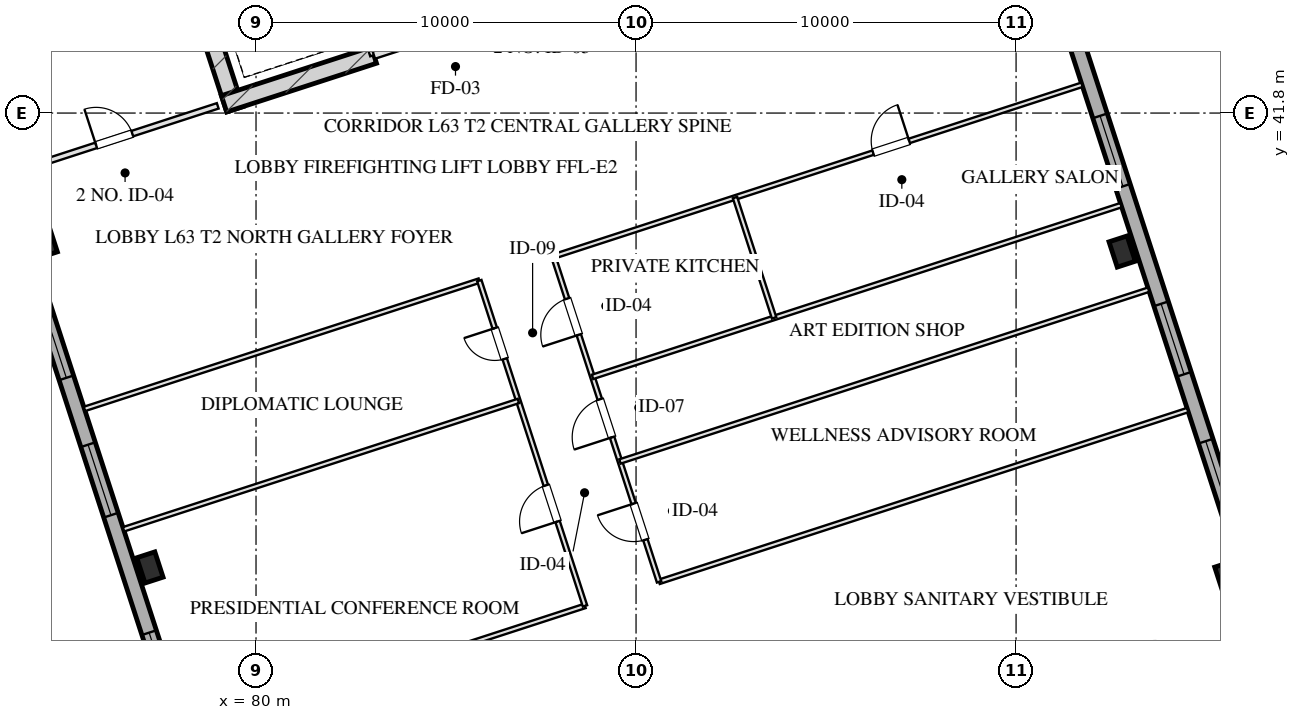
"""IFC4 building model, lengths in metres.
Left out: names, types, materials, properties, quantities, classifications, styles, units other than length and angle.
Written with IfcOpenShell. Run it as: python <this file> out.ifc"""

import sys

from ifc_helpers import new_model, si_unit, direction, frame, frame_2d, origin, origin_2d, place, context, subcontext, project, spatial, rectangle, hollow_rectangle, extrude, element, fill, save


model = new_model("IFC4")
c1 = context("Model", 3, precision=1e-05, world=origin(), true_north=direction((0.0, 1.0)))
c2 = subcontext(c1, "Body", "Model", "MODEL_VIEW")
j1 = project(units=[si_unit("LENGTHUNIT", "METRE"), si_unit("PLANEANGLEUNIT", "RADIAN")], contexts=[c1])
p1 = place(None, origin())
s1 = spatial("IfcSite", under=j1, at=p1, CompositionType="ELEMENT")
p2 = place(p1, origin())
s2 = spatial("IfcBuilding", under=s1, at=p2, CompositionType="ELEMENT")
p3 = place(p2, frame((0.0, 0.0, 234.4)))
s3 = spatial("IfcBuildingStorey", under=s2, at=p3, CompositionType="ELEMENT", Elevation=234.4)
p4 = place(p3, frame((79.442, 41.899, 0.0), z_axis=(0.0, 0.0, 1.0), x_axis=(-0.309035778627, 0.951050412717, 0.0)))
e1 = element("IfcWall", 1, at=p4, inside=s3, PredefinedType="SHEAR", context=c2, shape_type="SweptSolid", body=[
    extrude(rectangle(XDim=9.33, YDim=0.45, at=frame_2d((4.665, 0.0))), origin(), (0.0, 0.0, 1.0), 3.2),
])
p5 = place(p3, frame((79.159, 42.043, 0.0), z_axis=(0.0, 0.0, 1.0), x_axis=(0.951047485828, 0.309044785913, 0.0)))
e2 = element("IfcWall", 2, at=p5, inside=s3, PredefinedType="SHEAR", context=c2, shape_type="SweptSolid", body=[
    extrude(rectangle(XDim=4.145, YDim=0.45, at=frame_2d((2.073, 0.0))), origin(), (0.0, 0.0, 1.0), 3.2),
])
for number, where, z_axis, x_axis in (
    (3, (77.208, 29.844, 0.0), (0.0, 0.0, 1.0), (0.951, 0.309, 0.0)),
    (4, (74.427, 38.403, 0.0), (0.0, 0.0, 1.0), (0.951, 0.309, 0.0)),
    (5, (105.573, 29.597, 0.0), (0.0, 0.0, 1.0), (0.951, 0.309, 0.0)),
    (6, (102.792, 38.156, 0.0), (0.0, 0.0, 1.0), (0.951, 0.309, 0.0)),
):
    element("IfcColumn", number, at=place(p3, frame(where, z_axis=z_axis, x_axis=x_axis)), inside=s3, PredefinedType="COLUMN", context=c2, shape_type="SweptSolid", body=[
        extrude(hollow_rectangle(XDim=0.5, YDim=0.7, WallThickness=0.025, at=origin_2d()), origin(), (0.0, 0.0, 1.0), 3.201),
    ])
p6 = place(p3, frame((82.618, 11.414, 0.0), z_axis=(0.0, 0.0, 1.0), x_axis=(-0.309016491071, 0.951056679828, 0.0)))
e7 = element("IfcWall", 7, at=p6, inside=s3, PredefinedType="SOLIDWALL", context=c2, shape_type="SweptSolid", body=[
    extrude(rectangle(XDim=38.4, YDim=0.4, at=frame_2d((19.2, 0.0))), origin(), (0.0, 0.0, 1.0), 2.36),
])
p7 = place(p6, frame((11.825, 0.0, 0.75)))
e8 = element("IfcOpeningElement", 8, at=p7, cuts=e7, PredefinedType="OPENING", context=c2, shape_type="SweptSolid", body=[
    extrude(rectangle(XDim=1.95, YDim=1.21, at=frame_2d((0.975, 0.605))), frame((0.0, 0.21, 0.0), z_axis=(0.0, -1.0, 0.0), x_axis=(1.0, 0.0, 0.0)), (0.0, 0.0, 1.0), 0.42),
])
p8 = place(p6, frame((15.625, 0.0, 0.75)))
e9 = element("IfcOpeningElement", 9, at=p8, cuts=e7, PredefinedType="OPENING", context=c2, shape_type="SweptSolid", body=[
    extrude(rectangle(XDim=1.95, YDim=1.21, at=frame_2d((0.975, 0.605))), frame((0.0, 0.21, 0.0), z_axis=(0.0, -1.0, 0.0), x_axis=(1.0, 0.0, 0.0)), (0.0, 0.0, 1.0), 0.42),
])
p9 = place(p6, frame((20.825, 0.0, 0.75)))
e10 = element("IfcOpeningElement", 10, at=p9, cuts=e7, PredefinedType="OPENING", context=c2, shape_type="SweptSolid", body=[
    extrude(rectangle(XDim=1.95, YDim=1.21, at=frame_2d((0.975, 0.605))), frame((0.0, 0.21, 0.0), z_axis=(0.0, -1.0, 0.0), x_axis=(1.0, 0.0, 0.0)), (0.0, 0.0, 1.0), 0.42),
])
p10 = place(p6, frame((24.625, 0.0, 0.75)))
e11 = element("IfcOpeningElement", 11, at=p10, cuts=e7, PredefinedType="OPENING", context=c2, shape_type="SweptSolid", body=[
    extrude(rectangle(XDim=1.95, YDim=1.21, at=frame_2d((0.975, 0.605))), frame((0.0, 0.21, 0.0), z_axis=(0.0, -1.0, 0.0), x_axis=(1.0, 0.0, 0.0)), (0.0, 0.0, 1.0), 0.42),
])
p11 = place(p3, frame((97.382, 56.586, 0.0), z_axis=(0.0, 0.0, 1.0), x_axis=(0.309016491071, -0.951056679828, 0.0)))
e12 = element("IfcWall", 12, at=p11, inside=s3, PredefinedType="SOLIDWALL", context=c2, shape_type="SweptSolid", body=[
    extrude(rectangle(XDim=38.4, YDim=0.4, at=frame_2d((19.2, 0.0))), origin(), (0.0, 0.0, 1.0), 2.36),
])
p12 = place(p11, frame((24.625, 0.0, 0.75)))
e13 = element("IfcOpeningElement", 13, at=p12, cuts=e12, PredefinedType="OPENING", context=c2, shape_type="SweptSolid", body=[
    extrude(rectangle(XDim=1.95, YDim=1.21, at=frame_2d((0.975, 0.605))), frame((0.0, 0.21, 0.0), z_axis=(0.0, -1.0, 0.0), x_axis=(1.0, 0.0, 0.0)), (0.0, 0.0, 1.0), 0.42),
])
p13 = place(p11, frame((20.825, 0.0, 0.75)))
e14 = element("IfcOpeningElement", 14, at=p13, cuts=e12, PredefinedType="OPENING", context=c2, shape_type="SweptSolid", body=[
    extrude(rectangle(XDim=1.95, YDim=1.21, at=frame_2d((0.975, 0.605))), frame((0.0, 0.21, 0.0), z_axis=(0.0, -1.0, 0.0), x_axis=(1.0, 0.0, 0.0)), (0.0, 0.0, 1.0), 0.42),
])
p14 = place(p11, frame((15.625, 0.0, 0.75)))
e15 = element("IfcOpeningElement", 15, at=p14, cuts=e12, PredefinedType="OPENING", context=c2, shape_type="SweptSolid", body=[
    extrude(rectangle(XDim=1.95, YDim=1.21, at=frame_2d((0.975, 0.605))), frame((0.0, 0.21, 0.0), z_axis=(0.0, -1.0, 0.0), x_axis=(1.0, 0.0, 0.0)), (0.0, 0.0, 1.0), 0.42),
])
p15 = place(p11, frame((11.825, 0.0, 0.75)))
e16 = element("IfcOpeningElement", 16, at=p15, cuts=e12, PredefinedType="OPENING", context=c2, shape_type="SweptSolid", body=[
    extrude(rectangle(XDim=1.95, YDim=1.21, at=frame_2d((0.975, 0.605))), frame((0.0, 0.21, 0.0), z_axis=(0.0, -1.0, 0.0), x_axis=(1.0, 0.0, 0.0)), (0.0, 0.0, 1.0), 0.42),
])
p16 = place(p3, frame((83.101, 43.324, 0.0), z_axis=(0.0, 0.0, 1.0), x_axis=(-0.309048298632, 0.951046344356, 0.0)))
e17 = element("IfcWall", 17, at=p16, inside=s3, PredefinedType="PARTITIONING", context=c2, shape_type="SweptSolid", body=[
    extrude(rectangle(XDim=1.9, YDim=0.2, at=frame_2d((0.95, 0.0))), origin(), (0.0, 0.0, 1.0), 2.925),
])
p17 = place(p16, frame((0.52, 0.0, 0.0)))
e18 = element("IfcOpeningElement", 18, at=p17, cuts=e17, PredefinedType="OPENING", context=c2, shape_type="SweptSolid", body=[
    extrude(rectangle(XDim=1.1, YDim=2.05, at=frame_2d((0.55, 1.025))), frame((0.0, 0.11, 0.0), z_axis=(0.0, -1.0, 0.0), x_axis=(1.0, 0.0, 0.0)), (0.0, 0.0, 1.0), 0.22),
])
p18 = place(p3, frame((83.101, 43.324, 0.0), z_axis=(0.0, 0.0, 1.0), x_axis=(0.951052804469, 0.309028417967, 0.0)))
e19 = element("IfcWall", 19, at=p18, inside=s3, PredefinedType="PARTITIONING", context=c2, shape_type="SweptSolid", body=[
    extrude(rectangle(XDim=3.83, YDim=0.2, at=frame_2d((1.915, 0.0))), origin(), (0.0, 0.0, 1.0), 2.925),
])
p19 = place(p18, frame((1.35, 0.0, 0.0)))
e20 = element("IfcOpeningElement", 20, at=p19, cuts=e19, PredefinedType="OPENING", context=c2, shape_type="SweptSolid", body=[
    extrude(rectangle(XDim=1.2, YDim=2.05, at=frame_2d((0.6, 1.025))), frame((0.0, 0.11, 0.0), z_axis=(0.0, -1.0, 0.0), x_axis=(1.0, 0.0, 0.0)), (0.0, 0.0, 1.0), 0.22),
])
p20 = place(p3, frame((73.476, 40.197, 0.0), z_axis=(0.0, 0.0, 1.0), x_axis=(0.951059431056, 0.309008023519, 0.0)))
e21 = element("IfcWall", 21, at=p20, inside=s3, PredefinedType="PARTITIONING", context=c2, shape_type="SweptSolid", body=[
    extrude(rectangle(XDim=5.8, YDim=0.15, at=frame_2d((2.9, 0.0))), origin(), (0.0, 0.0, 1.0), 2.925),
])
p21 = place(p20, frame((2.436, 0.0, 0.0)))
e22 = element("IfcOpeningElement", 22, at=p21, cuts=e21, PredefinedType="OPENING", context=c2, shape_type="SweptSolid", body=[
    extrude(rectangle(XDim=1.0, YDim=2.05, at=frame_2d((0.5, 1.025))), frame((0.0, 0.085, 0.0), z_axis=(0.0, -1.0, 0.0), x_axis=(1.0, 0.0, 0.0)), (0.0, 0.0, 1.0), 0.17),
])
p22 = place(p3, frame((78.266, 25.456, 0.0), z_axis=(0.0, 0.0, 1.0), x_axis=(0.951056072529, 0.309018360142, 0.0)))
e23 = element("IfcWall", 23, at=p22, inside=s3, PredefinedType="PARTITIONING", context=c2, shape_type="SweptSolid", body=[
    extrude(rectangle(XDim=10.925, YDim=0.12, at=frame_2d((5.462, 0.0))), origin(), (0.0, 0.0, 1.0), 2.925),
])
p23 = place(p3, frame((90.606, 29.465, 0.0), z_axis=(0.0, 0.0, 1.0), x_axis=(0.951058110432, 0.309012088082, 0.0)))
e24 = element("IfcWall", 24, at=p23, inside=s3, PredefinedType="PARTITIONING", context=c2, shape_type="SweptSolid", body=[
    extrude(rectangle(XDim=14.625, YDim=0.12, at=frame_2d((7.312, 0.0))), origin(), (0.0, 0.0, 1.0), 2.925),
])
p24 = place(p3, frame((75.485, 34.015, 0.0), z_axis=(0.0, 0.0, 1.0), x_axis=(0.951058206457, 0.309011792544, 0.0)))
e25 = element("IfcWall", 25, at=p24, inside=s3, PredefinedType="PARTITIONING", context=c2, shape_type="SweptSolid", body=[
    extrude(rectangle(XDim=10.925, YDim=0.12, at=frame_2d((5.462, 0.0))), origin(), (0.0, 0.0, 1.0), 2.925),
])
p25 = place(p3, frame((87.825, 38.025, 0.0), z_axis=(0.0, 0.0, 1.0), x_axis=(0.951058110432, 0.309012088082, 0.0)))
e26 = element("IfcWall", 26, at=p25, inside=s3, PredefinedType="PARTITIONING", context=c2, shape_type="SweptSolid", body=[
    extrude(rectangle(XDim=14.625, YDim=0.12, at=frame_2d((7.312, 0.0))), origin(), (0.0, 0.0, 1.0), 2.925),
])
p26 = place(p25, frame((8.845, 0.0, 0.0)))
e27 = element("IfcOpeningElement", 27, at=p26, cuts=e26, PredefinedType="OPENING", context=c2, shape_type="SweptSolid", body=[
    extrude(rectangle(XDim=1.0, YDim=2.05, at=frame_2d((0.5, 1.025))), frame((0.0, 0.07, 0.0), z_axis=(0.0, -1.0, 0.0), x_axis=(1.0, 0.0, 0.0)), (0.0, 0.0, 1.0), 0.14),
])
p27 = place(p3, frame((88.656, 28.832, 0.0), z_axis=(0.0, 0.0, 1.0), x_axis=(-0.309000197986, 0.951061973609, 0.0)))
e28 = element("IfcWall", 28, at=p27, inside=s3, PredefinedType="PARTITIONING", context=c2, shape_type="SweptSolid", body=[
    extrude(rectangle(XDim=9.0, YDim=0.12, at=frame_2d((4.5, 0.0))), origin(), (0.0, 0.0, 1.0), 2.925),
])
p28 = place(p27, frame((2.335, 0.0, 0.0)))
e29 = element("IfcOpeningElement", 29, at=p28, cuts=e28, PredefinedType="OPENING", context=c2, shape_type="SweptSolid", body=[
    extrude(rectangle(XDim=1.0, YDim=2.05, at=frame_2d((0.5, 1.025))), frame((0.0, 0.07, 0.0), z_axis=(0.0, -1.0, 0.0), x_axis=(1.0, 0.0, 0.0)), (0.0, 0.0, 1.0), 0.14),
])
p29 = place(p27, frame((6.835, 0.0, 0.0)))
e30 = element("IfcOpeningElement", 30, at=p29, cuts=e28, PredefinedType="OPENING", context=c2, shape_type="SweptSolid", body=[
    extrude(rectangle(XDim=0.85, YDim=2.05, at=frame_2d((0.425, 1.025))), frame((0.0, 0.07, 0.0), z_axis=(0.0, -1.0, 0.0), x_axis=(1.0, 0.0, 0.0)), (0.0, 0.0, 1.0), 0.14),
])
p30 = place(p3, frame((90.606, 29.465, 0.0), z_axis=(0.0, 0.0, 1.0), x_axis=(-0.309024734286, 0.951054001411, 0.0)))
e31 = element("IfcWall", 31, at=p30, inside=s3, PredefinedType="PARTITIONING", context=c2, shape_type="SweptSolid", body=[
    extrude(rectangle(XDim=9.0, YDim=0.12, at=frame_2d((4.5, 0.0))), origin(), (0.0, 0.0, 1.0), 2.925),
])
p31 = place(p30, frame((1.165, 0.0, 0.0)))
e32 = element("IfcOpeningElement", 32, at=p31, cuts=e31, PredefinedType="OPENING", context=c2, shape_type="SweptSolid", body=[
    extrude(rectangle(XDim=1.0, YDim=2.05, at=frame_2d((0.5, 1.025))), frame((0.0, 0.07, 0.0), z_axis=(0.0, -1.0, 0.0), x_axis=(1.0, 0.0, 0.0)), (0.0, 0.0, 1.0), 0.14),
])
p32 = place(p30, frame((4.0, 0.0, 0.0)))
e33 = element("IfcOpeningElement", 33, at=p32, cuts=e31, PredefinedType="OPENING", context=c2, shape_type="SweptSolid", body=[
    extrude(rectangle(XDim=1.05, YDim=2.05, at=frame_2d((0.525, 1.025))), frame((0.0, 0.07, 0.0), z_axis=(0.0, -1.0, 0.0), x_axis=(1.0, 0.0, 0.0)), (0.0, 0.0, 1.0), 0.14),
])
p33 = place(p30, frame((6.835, 0.0, 0.0)))
e34 = element("IfcOpeningElement", 34, at=p33, cuts=e31, PredefinedType="OPENING", context=c2, shape_type="SweptSolid", body=[
    extrude(rectangle(XDim=1.0, YDim=2.05, at=frame_2d((0.5, 1.025))), frame((0.0, 0.07, 0.0), z_axis=(0.0, -1.0, 0.0), x_axis=(1.0, 0.0, 0.0)), (0.0, 0.0, 1.0), 0.14),
])
p34 = place(p3, frame((76.514, 30.848, 0.0), z_axis=(0.0, 0.0, 1.0), x_axis=(0.951056072529, 0.309018360142, 0.0)))
e35 = element("IfcWall", 35, at=p34, inside=s3, PredefinedType="PARTITIONING", context=c2, shape_type="SweptSolid", body=[
    extrude(rectangle(XDim=10.925, YDim=0.12, at=frame_2d((5.462, 0.0))), origin(), (0.0, 0.0, 1.0), 2.925),
])
for number, where, z_axis, x_axis in (
    (36, (89.577, 32.632, 0.0), (0.0, 0.0, 1.0), (0.951, 0.309, 0.0)),
    (37, (88.854, 34.858, 0.0), (0.0, 0.0, 1.0), (0.951, 0.309, 0.0)),
):
    element("IfcWall", number, at=place(p3, frame(where, z_axis=z_axis, x_axis=x_axis)), inside=s3, PredefinedType="PARTITIONING", context=c2, shape_type="SweptSolid", body=[
        extrude(rectangle(XDim=14.625, YDim=0.12, at=frame_2d((7.312, 0.0))), origin(), (0.0, 0.0, 1.0), 2.925),
    ])
p35 = place(p3, frame((93.633, 36.411, 0.0), z_axis=(0.0, 0.0, 1.0), x_axis=(-0.309026391202, 0.95105346303, 0.0)))
e38 = element("IfcWall", 38, at=p35, inside=s3, PredefinedType="PARTITIONING", context=c2, shape_type="SweptSolid", body=[
    extrude(rectangle(XDim=3.33, YDim=0.12, at=frame_2d((1.665, 0.0))), origin(), (0.0, 0.0, 1.0), 2.925),
])
p36 = place(p8, origin())
e39 = element("IfcWindow", 39, at=p36, inside=s3, PartitioningType="TRIPLE_PANEL_VERTICAL", PredefinedType="WINDOW", context=c2, shape_type="SweptSolid", body=[
    extrude(rectangle(XDim=1.95, YDim=1.21, at=frame_2d((0.975, 0.605))), frame((0.0, 0.03, 0.0), z_axis=(0.0, -1.0, 0.0), x_axis=(1.0, 0.0, 0.0)), (0.0, 0.0, 1.0), 0.06),
])
fill(e9, e39)
p37 = place(p9, origin())
e40 = element("IfcWindow", 40, at=p37, inside=s3, PartitioningType="TRIPLE_PANEL_VERTICAL", PredefinedType="WINDOW", context=c2, shape_type="SweptSolid", body=[
    extrude(rectangle(XDim=1.95, YDim=1.21, at=frame_2d((0.975, 0.605))), frame((0.0, 0.03, 0.0), z_axis=(0.0, -1.0, 0.0), x_axis=(1.0, 0.0, 0.0)), (0.0, 0.0, 1.0), 0.06),
])
fill(e10, e40)
p38 = place(p10, origin())
e41 = element("IfcWindow", 41, at=p38, inside=s3, PartitioningType="TRIPLE_PANEL_VERTICAL", PredefinedType="WINDOW", context=c2, shape_type="SweptSolid", body=[
    extrude(rectangle(XDim=1.95, YDim=1.21, at=frame_2d((0.975, 0.605))), frame((0.0, 0.03, 0.0), z_axis=(0.0, -1.0, 0.0), x_axis=(1.0, 0.0, 0.0)), (0.0, 0.0, 1.0), 0.06),
])
fill(e11, e41)
p39 = place(p12, origin())
e42 = element("IfcWindow", 42, at=p39, inside=s3, PartitioningType="TRIPLE_PANEL_VERTICAL", PredefinedType="WINDOW", context=c2, shape_type="SweptSolid", body=[
    extrude(rectangle(XDim=1.95, YDim=1.21, at=frame_2d((0.975, 0.605))), frame((0.0, 0.03, 0.0), z_axis=(0.0, -1.0, 0.0), x_axis=(1.0, 0.0, 0.0)), (0.0, 0.0, 1.0), 0.06),
])
fill(e13, e42)
p40 = place(p13, origin())
e43 = element("IfcWindow", 43, at=p40, inside=s3, PartitioningType="TRIPLE_PANEL_VERTICAL", PredefinedType="WINDOW", context=c2, shape_type="SweptSolid", body=[
    extrude(rectangle(XDim=1.95, YDim=1.21, at=frame_2d((0.975, 0.605))), frame((0.0, 0.03, 0.0), z_axis=(0.0, -1.0, 0.0), x_axis=(1.0, 0.0, 0.0)), (0.0, 0.0, 1.0), 0.06),
])
fill(e14, e43)
p41 = place(p14, origin())
e44 = element("IfcWindow", 44, at=p41, inside=s3, PartitioningType="TRIPLE_PANEL_VERTICAL", PredefinedType="WINDOW", context=c2, shape_type="SweptSolid", body=[
    extrude(rectangle(XDim=1.95, YDim=1.21, at=frame_2d((0.975, 0.605))), frame((0.0, 0.03, 0.0), z_axis=(0.0, -1.0, 0.0), x_axis=(1.0, 0.0, 0.0)), (0.0, 0.0, 1.0), 0.06),
])
fill(e15, e44)
p42 = place(p21, origin())
e45 = element("IfcDoor", 45, at=p42, inside=s3, OperationType="SINGLE_SWING_LEFT", PredefinedType="DOOR", context=c2, shape_type="SweptSolid", body=[
    extrude(rectangle(XDim=1.0, YDim=2.05, at=frame_2d((0.5, 1.025))), frame((0.0, 0.025, 0.0), z_axis=(0.0, -1.0, 0.0), x_axis=(1.0, 0.0, 0.0)), (0.0, 0.0, 1.0), 0.05),
])
fill(e22, e45)
p43 = place(p26, origin())
e46 = element("IfcDoor", 46, at=p43, inside=s3, OperationType="SINGLE_SWING_RIGHT", PredefinedType="DOOR", context=c2, shape_type="SweptSolid", body=[
    extrude(rectangle(XDim=1.0, YDim=2.05, at=frame_2d((0.5, 1.025))), frame((0.0, 0.025, 0.0), z_axis=(0.0, -1.0, 0.0), x_axis=(1.0, 0.0, 0.0)), (0.0, 0.0, 1.0), 0.05),
])
fill(e27, e46)
p44 = place(p28, origin())
e47 = element("IfcDoor", 47, at=p44, inside=s3, OperationType="SINGLE_SWING_LEFT", PredefinedType="DOOR", context=c2, shape_type="SweptSolid", body=[
    extrude(rectangle(XDim=1.0, YDim=2.05, at=frame_2d((0.5, 1.025))), frame((0.0, 0.025, 0.0), z_axis=(0.0, -1.0, 0.0), x_axis=(1.0, 0.0, 0.0)), (0.0, 0.0, 1.0), 0.05),
])
fill(e29, e47)
p45 = place(p29, origin())
e48 = element("IfcDoor", 48, at=p45, inside=s3, OperationType="SINGLE_SWING_RIGHT", PredefinedType="DOOR", context=c2, shape_type="SweptSolid", body=[
    extrude(rectangle(XDim=0.85, YDim=2.05, at=frame_2d((0.425, 1.025))), frame((0.0, 0.025, 0.0), z_axis=(0.0, -1.0, 0.0), x_axis=(1.0, 0.0, 0.0)), (0.0, 0.0, 1.0), 0.05),
])
fill(e30, e48)
p46 = place(p31, origin())
e49 = element("IfcDoor", 49, at=p46, inside=s3, OperationType="SINGLE_SWING_RIGHT", PredefinedType="DOOR", context=c2, shape_type="SweptSolid", body=[
    extrude(rectangle(XDim=1.0, YDim=2.05, at=frame_2d((0.5, 1.025))), frame((0.0, 0.025, 0.0), z_axis=(0.0, -1.0, 0.0), x_axis=(1.0, 0.0, 0.0)), (0.0, 0.0, 1.0), 0.05),
])
fill(e32, e49)
p47 = place(p32, origin())
e50 = element("IfcDoor", 50, at=p47, inside=s3, OperationType="SINGLE_SWING_LEFT", PredefinedType="DOOR", context=c2, shape_type="SweptSolid", body=[
    extrude(rectangle(XDim=1.05, YDim=2.05, at=frame_2d((0.525, 1.025))), frame((0.0, 0.025, 0.0), z_axis=(0.0, -1.0, 0.0), x_axis=(1.0, 0.0, 0.0)), (0.0, 0.0, 1.0), 0.05),
])
fill(e33, e50)
p48 = place(p33, origin())
e51 = element("IfcDoor", 51, at=p48, inside=s3, OperationType="SINGLE_SWING_LEFT", PredefinedType="DOOR", context=c2, shape_type="SweptSolid", body=[
    extrude(rectangle(XDim=1.0, YDim=2.05, at=frame_2d((0.5, 1.025))), frame((0.0, 0.025, 0.0), z_axis=(0.0, -1.0, 0.0), x_axis=(1.0, 0.0, 0.0)), (0.0, 0.0, 1.0), 0.05),
])
fill(e34, e51)
save(model, sys.argv[1])
